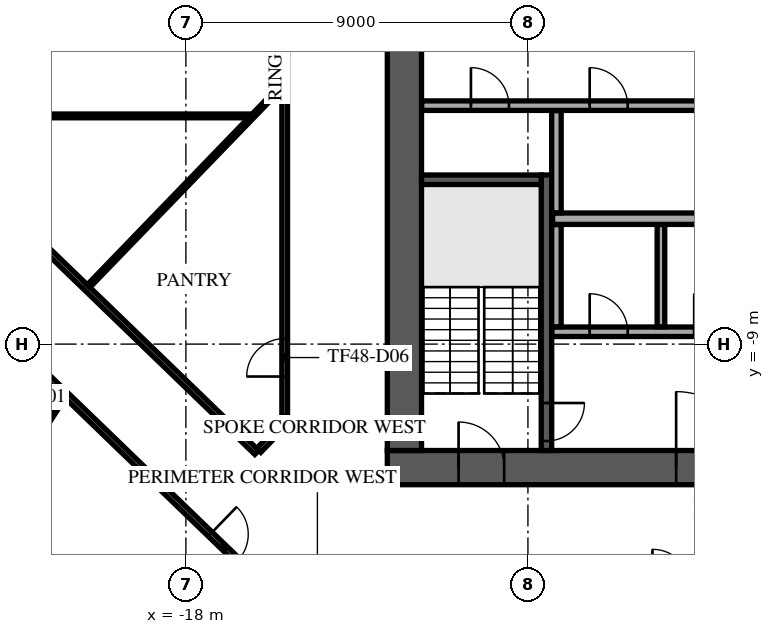
"""IFC4 building model, lengths in metres.
Left out: names, types, materials, properties, quantities, classifications, styles, units other than length and angle.
Written with IfcOpenShell. Run it as: python <this file> out.ifc"""

import sys

from ifc_helpers import new_model, si_unit, direction, frame, frame_2d, origin, place, context, subcontext, project, spatial, rectangle, extrude, element, fill, save


model = new_model("IFC4")
c1 = context("Model", 3, precision=1e-05, world=origin(), true_north=direction((0.0, 1.0)))
c2 = subcontext(c1, "Body", "Model", "MODEL_VIEW")
j1 = project(units=[si_unit("LENGTHUNIT", "METRE"), si_unit("PLANEANGLEUNIT", "RADIAN")], contexts=[c1])
p1 = place(None, origin())
s1 = spatial("IfcSite", under=j1, at=p1, CompositionType="ELEMENT")
p2 = place(p1, origin())
s2 = spatial("IfcBuilding", under=s1, at=p2, CompositionType="ELEMENT")
p3 = place(p2, frame((0.0, 0.0, 205.3)))
s3 = spatial("IfcBuildingStorey", under=s2, at=p3, CompositionType="ELEMENT", Elevation=205.3)
p4 = place(p3, frame((-12.7, -12.25, 0.0), z_axis=(0.0, 0.0, 1.0), x_axis=(1.0, 0.0, 0.0)))
e1 = element("IfcWall", 1, at=p4, inside=s3, PredefinedType="SHEAR", context=c2, shape_type="SweptSolid", body=[
    extrude(rectangle(XDim=25.4, YDim=0.9, at=frame_2d((12.7, 0.0))), origin(), (0.0, 0.0, 1.0), 3.62),
])
p5 = place(p4, frame((7.6, 0.0, 0.0)))
e2 = element("IfcOpeningElement", 2, at=p5, cuts=e1, PredefinedType="OPENING", context=c2, shape_type="SweptSolid", body=[
    extrude(rectangle(XDim=2.0, YDim=2.1, at=frame_2d((1.0, 1.05))), frame((0.0, 0.46, 0.0), z_axis=(0.0, -1.0, 0.0), x_axis=(1.0, 0.0, 0.0)), (0.0, 0.0, 1.0), 0.92),
])
p6 = place(p4, frame((17.725, 0.0, 0.0)))
e3 = element("IfcOpeningElement", 3, at=p6, cuts=e1, PredefinedType="OPENING", context=c2, shape_type="SweptSolid", body=[
    extrude(rectangle(XDim=1.2, YDim=2.1, at=frame_2d((0.6, 1.05))), frame((0.0, 0.46, 0.0), z_axis=(0.0, -1.0, 0.0), x_axis=(1.0, 0.0, 0.0)), (0.0, 0.0, 1.0), 0.92),
])
p7 = place(p4, frame((1.875, 0.0, 0.0)))
e4 = element("IfcOpeningElement", 4, at=p7, cuts=e1, PredefinedType="OPENING", context=c2, shape_type="SweptSolid", body=[
    extrude(rectangle(XDim=1.2, YDim=2.1, at=frame_2d((0.6, 1.05))), frame((0.0, 0.46, 0.0), z_axis=(0.0, -1.0, 0.0), x_axis=(1.0, 0.0, 0.0)), (0.0, 0.0, 1.0), 0.92),
])
p8 = place(p4, frame((22.325, 0.0, 0.0)))
e5 = element("IfcOpeningElement", 5, at=p8, cuts=e1, PredefinedType="OPENING", context=c2, shape_type="SweptSolid", body=[
    extrude(rectangle(XDim=1.2, YDim=2.1, at=frame_2d((0.6, 1.05))), frame((0.0, 0.46, 0.0), z_axis=(0.0, -1.0, 0.0), x_axis=(1.0, 0.0, 0.0)), (0.0, 0.0, 1.0), 0.92),
])
p9 = place(p3, frame((-12.25, -11.8, 0.0), z_axis=(0.0, 0.0, 1.0), x_axis=(0.0, 1.0, 0.0)))
e6 = element("IfcWall", 6, at=p9, inside=s3, PredefinedType="SHEAR", context=c2, shape_type="SweptSolid", body=[
    extrude(rectangle(XDim=23.6, YDim=0.9, at=frame_2d((11.8, 0.0))), origin(), (0.0, 0.0, 1.0), 3.62),
])
p10 = place(p9, frame((10.6, 0.0, 0.0)))
e7 = element("IfcOpeningElement", 7, at=p10, cuts=e6, PredefinedType="OPENING", context=c2, shape_type="SweptSolid", body=[
    extrude(rectangle(XDim=2.4, YDim=2.4, at=frame_2d((1.2, 1.2))), frame((0.0, 0.46, 0.0), z_axis=(0.0, -1.0, 0.0), x_axis=(1.0, 0.0, 0.0)), (0.0, 0.0, 1.0), 0.92),
])
p11 = place(p3, frame((-8.512, -4.55, 0.0), z_axis=(0.0, 0.0, 1.0), x_axis=(0.0, -1.0, 0.0)))
e8 = element("IfcWall", 8, at=p11, inside=s3, PredefinedType="SOLIDWALL", context=c2, shape_type="SweptSolid", body=[
    extrude(rectangle(XDim=7.25, YDim=0.275, at=frame_2d((3.625, 0.0))), origin(), (0.0, 0.0, 1.0), 3.62),
])
p12 = place(p11, frame((6.0, 0.0, 0.0)))
e9 = element("IfcOpeningElement", 9, at=p12, cuts=e8, PredefinedType="OPENING", context=c2, shape_type="SweptSolid", body=[
    extrude(rectangle(XDim=1.0, YDim=2.1, at=frame_2d((0.5, 1.05))), frame((0.0, 0.147, 0.0), z_axis=(0.0, -1.0, 0.0), x_axis=(1.0, 0.0, 0.0)), (0.0, 0.0, 1.0), 0.295),
])
p13 = place(p3, frame((-8.65, -4.675, 0.0), z_axis=(0.0, 0.0, 1.0), x_axis=(-1.0, 0.0, 0.0)))
e10 = element("IfcWall", 10, at=p13, inside=s3, PredefinedType="SOLIDWALL", context=c2, shape_type="SweptSolid", body=[
    extrude(rectangle(XDim=3.15, YDim=0.25, at=frame_2d((1.575, 0.0))), origin(), (0.0, 0.0, 1.0), 3.62),
])
p14 = place(p3, frame((-8.37, -8.675, 0.0), z_axis=(0.0, 0.0, 1.0), x_axis=(1.0, 0.0, 0.0)))
e11 = element("IfcWall", 11, at=p14, inside=s3, PredefinedType="PARTITIONING", context=c2, shape_type="SweptSolid", body=[
    extrude(rectangle(XDim=5.49, YDim=0.25, at=frame_2d((2.745, 0.0))), origin(), (0.0, 0.0, 1.0), 3.62),
])
p15 = place(p14, frame((0.995, 0.0, 0.0)))
e12 = element("IfcOpeningElement", 12, at=p15, cuts=e11, PredefinedType="OPENING", context=c2, shape_type="SweptSolid", body=[
    extrude(rectangle(XDim=1.0, YDim=2.1, at=frame_2d((0.5, 1.05))), frame((0.0, 0.135, 0.0), z_axis=(0.0, -1.0, 0.0), x_axis=(1.0, 0.0, 0.0)), (0.0, 0.0, 1.0), 0.27),
])
p16 = place(p14, frame((3.745, 0.0, 0.0)))
e13 = element("IfcOpeningElement", 13, at=p16, cuts=e11, PredefinedType="OPENING", context=c2, shape_type="SweptSolid", body=[
    extrude(rectangle(XDim=1.0, YDim=2.1, at=frame_2d((0.5, 1.05))), frame((0.0, 0.135, 0.0), z_axis=(0.0, -1.0, 0.0), x_axis=(1.0, 0.0, 0.0)), (0.0, 0.0, 1.0), 0.27),
])
p17 = place(p3, frame((-8.25, -8.545, 0.0), z_axis=(0.0, 0.0, 1.0), x_axis=(0.0, 1.0, 0.0)))
e14 = element("IfcWall", 14, at=p17, inside=s3, PredefinedType="PARTITIONING", context=c2, shape_type="SweptSolid", body=[
    extrude(rectangle(XDim=2.69, YDim=0.25, at=frame_2d((1.345, 0.0))), origin(), (0.0, 0.0, 1.0), 3.62),
])
p18 = place(p3, frame((-5.5, -8.545, 0.0), z_axis=(0.0, 0.0, 1.0), x_axis=(0.0, 1.0, 0.0)))
e15 = element("IfcWall", 15, at=p18, inside=s3, PredefinedType="PARTITIONING", context=c2, shape_type="SweptSolid", body=[
    extrude(rectangle(XDim=2.69, YDim=0.2, at=frame_2d((1.345, 0.0))), origin(), (0.0, 0.0, 1.0), 3.62),
])
p19 = place(p3, frame((-8.35, -5.7, 0.0), z_axis=(0.0, 0.0, 1.0), x_axis=(1.0, 0.0, 0.0)))
e16 = element("IfcWall", 16, at=p19, inside=s3, PredefinedType="PARTITIONING", context=c2, shape_type="SweptSolid", body=[
    extrude(rectangle(XDim=5.47, YDim=0.3, at=frame_2d((2.735, 0.0))), origin(), (0.0, 0.0, 1.0), 3.62),
])
p20 = place(p3, frame((-8.25, -5.545, 0.0), z_axis=(0.0, 0.0, 1.0), x_axis=(0.0, 1.0, 0.0)))
e17 = element("IfcWall", 17, at=p20, inside=s3, PredefinedType="PARTITIONING", context=c2, shape_type="SweptSolid", body=[
    extrude(rectangle(XDim=2.69, YDim=0.25, at=frame_2d((1.345, 0.0))), origin(), (0.0, 0.0, 1.0), 3.62),
])
p21 = place(p3, frame((-11.795, -2.725, 0.0), z_axis=(0.0, 0.0, 1.0), x_axis=(1.0, 0.0, 0.0)))
e18 = element("IfcWall", 18, at=p21, inside=s3, PredefinedType="PARTITIONING", context=c2, shape_type="SweptSolid", body=[
    extrude(rectangle(XDim=8.915, YDim=0.25, at=frame_2d((4.458, 0.0))), origin(), (0.0, 0.0, 1.0), 3.62),
])
p22 = place(p21, frame((1.295, 0.0, 0.0)))
e19 = element("IfcOpeningElement", 19, at=p22, cuts=e18, PredefinedType="OPENING", context=c2, shape_type="SweptSolid", body=[
    extrude(rectangle(XDim=1.0, YDim=2.1, at=frame_2d((0.5, 1.05))), frame((0.0, 0.135, 0.0), z_axis=(0.0, -1.0, 0.0), x_axis=(1.0, 0.0, 0.0)), (0.0, 0.0, 1.0), 0.27),
])
p23 = place(p21, frame((4.42, 0.0, 0.0)))
e20 = element("IfcOpeningElement", 20, at=p23, cuts=e18, PredefinedType="OPENING", context=c2, shape_type="SweptSolid", body=[
    extrude(rectangle(XDim=1.0, YDim=2.1, at=frame_2d((0.5, 1.05))), frame((0.0, 0.135, 0.0), z_axis=(0.0, -1.0, 0.0), x_axis=(1.0, 0.0, 0.0)), (0.0, 0.0, 1.0), 0.27),
])
p24 = place(p3, frame((-34.658, -7.819, 0.0), z_axis=(0.0, 0.0, 1.0), x_axis=(0.719340729741, -0.694657408034, 0.0)))
e21 = element("IfcWall", 21, at=p24, inside=s3, PredefinedType="STANDARD", context=c2, shape_type="SweptSolid", body=[
    extrude(rectangle(XDim=39.0, YDim=0.6, at=frame_2d((19.5, 0.0))), origin(), (0.0, 0.0, 1.0), 3.62),
])
p25 = place(p24, frame((1.217, 0.0, 0.9)))
e22 = element("IfcOpeningElement", 22, at=p25, cuts=e21, PredefinedType="OPENING", context=c2, shape_type="SweptSolid", body=[
    extrude(rectangle(XDim=1.9, YDim=2.1, at=frame_2d((0.95, 1.05))), frame((0.0, 0.31, 0.0), z_axis=(0.0, -1.0, 0.0), x_axis=(1.0, 0.0, 0.0)), (0.0, 0.0, 1.0), 0.62),
])
p26 = place(p24, frame((5.55, 0.0, 0.9)))
e23 = element("IfcOpeningElement", 23, at=p26, cuts=e21, PredefinedType="OPENING", context=c2, shape_type="SweptSolid", body=[
    extrude(rectangle(XDim=1.9, YDim=2.1, at=frame_2d((0.95, 1.05))), frame((0.0, 0.31, 0.0), z_axis=(0.0, -1.0, 0.0), x_axis=(1.0, 0.0, 0.0)), (0.0, 0.0, 1.0), 0.62),
])
p27 = place(p24, frame((9.883, 0.0, 0.9)))
e24 = element("IfcOpeningElement", 24, at=p27, cuts=e21, PredefinedType="OPENING", context=c2, shape_type="SweptSolid", body=[
    extrude(rectangle(XDim=1.9, YDim=2.1, at=frame_2d((0.95, 1.05))), frame((0.0, 0.31, 0.0), z_axis=(0.0, -1.0, 0.0), x_axis=(1.0, 0.0, 0.0)), (0.0, 0.0, 1.0), 0.62),
])
p28 = place(p24, frame((14.217, 0.0, 0.9)))
e25 = element("IfcOpeningElement", 25, at=p28, cuts=e21, PredefinedType="OPENING", context=c2, shape_type="SweptSolid", body=[
    extrude(rectangle(XDim=1.9, YDim=2.1, at=frame_2d((0.95, 1.05))), frame((0.0, 0.31, 0.0), z_axis=(0.0, -1.0, 0.0), x_axis=(1.0, 0.0, 0.0)), (0.0, 0.0, 1.0), 0.62),
])
p29 = place(p24, frame((18.55, 0.0, 0.9)))
e26 = element("IfcOpeningElement", 26, at=p29, cuts=e21, PredefinedType="OPENING", context=c2, shape_type="SweptSolid", body=[
    extrude(rectangle(XDim=1.9, YDim=2.1, at=frame_2d((0.95, 1.05))), frame((0.0, 0.31, 0.0), z_axis=(0.0, -1.0, 0.0), x_axis=(1.0, 0.0, 0.0)), (0.0, 0.0, 1.0), 0.62),
])
p30 = place(p24, frame((22.883, 0.0, 0.9)))
e27 = element("IfcOpeningElement", 27, at=p30, cuts=e21, PredefinedType="OPENING", context=c2, shape_type="SweptSolid", body=[
    extrude(rectangle(XDim=1.9, YDim=2.1, at=frame_2d((0.95, 1.05))), frame((0.0, 0.31, 0.0), z_axis=(0.0, -1.0, 0.0), x_axis=(1.0, 0.0, 0.0)), (0.0, 0.0, 1.0), 0.62),
])
p31 = place(p24, frame((27.217, 0.0, 0.9)))
e28 = element("IfcOpeningElement", 28, at=p31, cuts=e21, PredefinedType="OPENING", context=c2, shape_type="SweptSolid", body=[
    extrude(rectangle(XDim=1.9, YDim=2.1, at=frame_2d((0.95, 1.05))), frame((0.0, 0.31, 0.0), z_axis=(0.0, -1.0, 0.0), x_axis=(1.0, 0.0, 0.0)), (0.0, 0.0, 1.0), 0.62),
])
p32 = place(p24, frame((31.55, 0.0, 0.9)))
e29 = element("IfcOpeningElement", 29, at=p32, cuts=e21, PredefinedType="OPENING", context=c2, shape_type="SweptSolid", body=[
    extrude(rectangle(XDim=1.9, YDim=2.1, at=frame_2d((0.95, 1.05))), frame((0.0, 0.31, 0.0), z_axis=(0.0, -1.0, 0.0), x_axis=(1.0, 0.0, 0.0)), (0.0, 0.0, 1.0), 0.62),
])
p33 = place(p24, frame((35.883, 0.0, 0.9)))
e30 = element("IfcOpeningElement", 30, at=p33, cuts=e21, PredefinedType="OPENING", context=c2, shape_type="SweptSolid", body=[
    extrude(rectangle(XDim=1.9, YDim=2.1, at=frame_2d((0.95, 1.05))), frame((0.0, 0.31, 0.0), z_axis=(0.0, -1.0, 0.0), x_axis=(1.0, 0.0, 0.0)), (0.0, 0.0, 1.0), 0.62),
])
p34 = place(p3, frame((-25.182, -1.629, 0.0), z_axis=(0.0, 0.0, 1.0), x_axis=(0.694683242855, 0.719315780514, 0.0)))
e31 = element("IfcWall", 31, at=p34, inside=s3, PredefinedType="PARTITIONING", context=c2, shape_type="SweptSolid", body=[
    extrude(rectangle(XDim=13.896, YDim=0.15, at=frame_2d((6.948, 0.0))), origin(), (0.0, 0.0, 1.0), 3.17),
])
p35 = place(p3, frame((-25.151, -6.479, 0.0), z_axis=(0.0, 0.0, 1.0), x_axis=(0.719341269489, -0.694656849106, 0.0)))
e32 = element("IfcWall", 32, at=p35, inside=s3, PredefinedType="PARTITIONING", context=c2, shape_type="SweptSolid", body=[
    extrude(rectangle(XDim=27.258, YDim=0.15, at=frame_2d((13.629, 0.0))), origin(), (0.0, 0.0, 1.0), 3.17),
])
p36 = place(p35, frame((3.55, 0.0, 0.0)))
e33 = element("IfcOpeningElement", 33, at=p36, cuts=e32, PredefinedType="OPENING", context=c2, shape_type="SweptSolid", body=[
    extrude(rectangle(XDim=1.0, YDim=2.1, at=frame_2d((0.5, 1.05))), frame((0.0, 0.085, 0.0), z_axis=(0.0, -1.0, 0.0), x_axis=(1.0, 0.0, 0.0)), (0.0, 0.0, 1.0), 0.17),
])
p37 = place(p35, frame((10.832, 0.0, 0.0)))
e34 = element("IfcOpeningElement", 34, at=p37, cuts=e32, PredefinedType="OPENING", context=c2, shape_type="SweptSolid", body=[
    extrude(rectangle(XDim=1.0, YDim=2.1, at=frame_2d((0.5, 1.05))), frame((0.0, 0.085, 0.0), z_axis=(0.0, -1.0, 0.0), x_axis=(1.0, 0.0, 0.0)), (0.0, 0.0, 1.0), 0.17),
])
p38 = place(p35, frame((13.797, 0.0, 0.0)))
e35 = element("IfcOpeningElement", 35, at=p38, cuts=e32, PredefinedType="OPENING", context=c2, shape_type="SweptSolid", body=[
    extrude(rectangle(XDim=1.0, YDim=2.1, at=frame_2d((0.5, 1.05))), frame((0.0, 0.085, 0.0), z_axis=(0.0, -1.0, 0.0), x_axis=(1.0, 0.0, 0.0)), (0.0, 0.0, 1.0), 0.17),
])
p39 = place(p3, frame((-23.484, -4.753, 0.0), z_axis=(0.0, 0.0, 1.0), x_axis=(0.719330221059, -0.694668289956, 0.0)))
e36 = element("IfcWall", 36, at=p39, inside=s3, PredefinedType="PARTITIONING", context=c2, shape_type="SweptSolid", body=[
    extrude(rectangle(XDim=10.216, YDim=0.15, at=frame_2d((5.108, 0.0))), origin(), (0.0, 0.0, 1.0), 3.17),
])
p40 = place(p3, frame((-16.083, -11.796, 0.0), z_axis=(0.0, 0.0, 1.0), x_axis=(0.694957895629, 0.719050431682, 0.0)))
e37 = element("IfcWall", 37, at=p40, inside=s3, PredefinedType="PARTITIONING", context=c2, shape_type="SweptSolid", body=[
    extrude(rectangle(XDim=0.983, YDim=0.15, at=frame_2d((0.491, 0.0))), origin(), (0.0, 0.0, 1.0), 3.17),
])
p41 = place(p3, frame((-15.4, -10.903, 0.0), z_axis=(0.0, 0.0, 1.0), x_axis=(0.0, 1.0, 0.0)))
e38 = element("IfcWall", 38, at=p41, inside=s3, PredefinedType="PARTITIONING", context=c2, shape_type="SweptSolid", body=[
    extrude(rectangle(XDim=19.403, YDim=0.15, at=frame_2d((9.702, 0.0))), origin(), (0.0, 0.0, 1.0), 3.17),
])
p42 = place(p41, frame((15.032, 0.0, 0.0)))
e39 = element("IfcOpeningElement", 39, at=p42, cuts=e38, PredefinedType="OPENING", context=c2, shape_type="SweptSolid", body=[
    extrude(rectangle(XDim=1.0, YDim=2.1, at=frame_2d((0.5, 1.05))), frame((0.0, 0.085, 0.0), z_axis=(0.0, -1.0, 0.0), x_axis=(1.0, 0.0, 0.0)), (0.0, 0.0, 1.0), 0.17),
])
p43 = place(p41, frame((1.05, 0.0, 0.0)))
e40 = element("IfcOpeningElement", 40, at=p43, cuts=e38, PredefinedType="OPENING", context=c2, shape_type="SweptSolid", body=[
    extrude(rectangle(XDim=1.0, YDim=2.1, at=frame_2d((0.5, 1.05))), frame((0.0, 0.085, 0.0), z_axis=(0.0, -1.0, 0.0), x_axis=(1.0, 0.0, 0.0)), (0.0, 0.0, 1.0), 0.17),
])
p44 = place(p3, frame((-29.115, -2.995, 0.0), z_axis=(0.0, 0.0, 1.0), x_axis=(1.0, 0.0, 0.0)))
e41 = element("IfcWall", 41, at=p44, inside=s3, PredefinedType="PARTITIONING", context=c2, shape_type="SweptSolid", body=[
    extrude(rectangle(XDim=12.762, YDim=0.1, at=frame_2d((6.381, 0.0))), origin(), (0.0, 0.0, 1.0), 3.05),
])
p45 = place(p3, frame((-25.182, -16.55, 0.0), z_axis=(0.0, 0.0, 1.0), x_axis=(0.541323767844, 0.84081423535, 0.0)))
e42 = element("IfcWall", 42, at=p45, inside=s3, PredefinedType="PARTITIONING", context=c2, shape_type="SweptSolid", body=[
    extrude(rectangle(XDim=7.321, YDim=0.1, at=frame_2d((3.661, 0.0))), origin(), (0.0, 0.0, 1.0), 2.97),
])
p46 = place(p3, frame((-20.56, -7.472, 0.0), z_axis=(0.0, 0.0, 1.0), x_axis=(0.694721601458, 0.719278733502, 0.0)))
e43 = element("IfcWall", 43, at=p46, inside=s3, PredefinedType="PARTITIONING", context=c2, shape_type="SweptSolid", body=[
    extrude(rectangle(XDim=7.267, YDim=0.1, at=frame_2d((3.634, 0.0))), origin(), (0.0, 0.0, 1.0), 3.17),
])
p47 = place(p5, origin())
e44 = element("IfcDoor", 44, at=p47, inside=s3, OperationType="SINGLE_SWING_LEFT", PredefinedType="DOOR", context=c2, shape_type="SweptSolid", body=[
    extrude(rectangle(XDim=2.0, YDim=2.1, at=frame_2d((1.0, 1.05))), frame((0.0, 0.025, 0.0), z_axis=(0.0, -1.0, 0.0), x_axis=(1.0, 0.0, 0.0)), (0.0, 0.0, 1.0), 0.05),
])
fill(e2, e44)
p48 = place(p7, origin())
e45 = element("IfcDoor", 45, at=p48, inside=s3, OperationType="SINGLE_SWING_LEFT", PredefinedType="DOOR", context=c2, shape_type="SweptSolid", body=[
    extrude(rectangle(XDim=1.2, YDim=2.1, at=frame_2d((0.6, 1.05))), frame((0.0, 0.025, 0.0), z_axis=(0.0, -1.0, 0.0), x_axis=(1.0, 0.0, 0.0)), (0.0, 0.0, 1.0), 0.05),
])
fill(e4, e45)
p49 = place(p12, origin())
e46 = element("IfcDoor", 46, at=p49, inside=s3, OperationType="SINGLE_SWING_LEFT", PredefinedType="DOOR", context=c2, shape_type="SweptSolid", body=[
    extrude(rectangle(XDim=1.0, YDim=2.1, at=frame_2d((0.5, 1.05))), frame((0.0, 0.025, 0.0), z_axis=(0.0, -1.0, 0.0), x_axis=(1.0, 0.0, 0.0)), (0.0, 0.0, 1.0), 0.05),
])
fill(e9, e46)
p50 = place(p15, origin())
e47 = element("IfcDoor", 47, at=p50, inside=s3, OperationType="SINGLE_SWING_LEFT", PredefinedType="DOOR", context=c2, shape_type="SweptSolid", body=[
    extrude(rectangle(XDim=1.0, YDim=2.1, at=frame_2d((0.5, 1.05))), frame((0.0, 0.025, 0.0), z_axis=(0.0, -1.0, 0.0), x_axis=(1.0, 0.0, 0.0)), (0.0, 0.0, 1.0), 0.05),
])
fill(e12, e47)
p51 = place(p16, origin())
e48 = element("IfcDoor", 48, at=p51, inside=s3, OperationType="SINGLE_SWING_LEFT", PredefinedType="DOOR", context=c2, shape_type="SweptSolid", body=[
    extrude(rectangle(XDim=1.0, YDim=2.1, at=frame_2d((0.5, 1.05))), frame((0.0, 0.025, 0.0), z_axis=(0.0, -1.0, 0.0), x_axis=(1.0, 0.0, 0.0)), (0.0, 0.0, 1.0), 0.05),
])
fill(e13, e48)
p52 = place(p22, origin())
e49 = element("IfcDoor", 49, at=p52, inside=s3, OperationType="SINGLE_SWING_LEFT", PredefinedType="DOOR", context=c2, shape_type="SweptSolid", body=[
    extrude(rectangle(XDim=1.0, YDim=2.1, at=frame_2d((0.5, 1.05))), frame((0.0, 0.025, 0.0), z_axis=(0.0, -1.0, 0.0), x_axis=(1.0, 0.0, 0.0)), (0.0, 0.0, 1.0), 0.05),
])
fill(e19, e49)
p53 = place(p23, origin())
e50 = element("IfcDoor", 50, at=p53, inside=s3, OperationType="SINGLE_SWING_LEFT", PredefinedType="DOOR", context=c2, shape_type="SweptSolid", body=[
    extrude(rectangle(XDim=1.0, YDim=2.1, at=frame_2d((0.5, 1.05))), frame((0.0, 0.025, 0.0), z_axis=(0.0, -1.0, 0.0), x_axis=(1.0, 0.0, 0.0)), (0.0, 0.0, 1.0), 0.05),
])
fill(e20, e50)
p54 = place(p37, frame((1.0, 0.0, 0.0), z_axis=(0.0, 0.0, 1.0), x_axis=(-1.0, 0.0, 0.0)))
e51 = element("IfcDoor", 51, at=p54, inside=s3, OperationType="SINGLE_SWING_RIGHT", PredefinedType="DOOR", context=c2, shape_type="SweptSolid", body=[
    extrude(rectangle(XDim=1.0, YDim=2.1, at=frame_2d((0.5, 1.05))), frame((0.0, 0.025, 0.0), z_axis=(0.0, -1.0, 0.0), x_axis=(1.0, 0.0, 0.0)), (0.0, 0.0, 1.0), 0.05),
])
fill(e34, e51)
p55 = place(p43, origin())
e52 = element("IfcDoor", 52, at=p55, inside=s3, OperationType="SINGLE_SWING_RIGHT", PredefinedType="DOOR", context=c2, shape_type="SweptSolid", body=[
    extrude(rectangle(XDim=1.0, YDim=2.1, at=frame_2d((0.5, 1.05))), frame((0.0, 0.025, 0.0), z_axis=(0.0, -1.0, 0.0), x_axis=(1.0, 0.0, 0.0)), (0.0, 0.0, 1.0), 0.05),
])
fill(e40, e52)
save(model, sys.argv[1])
